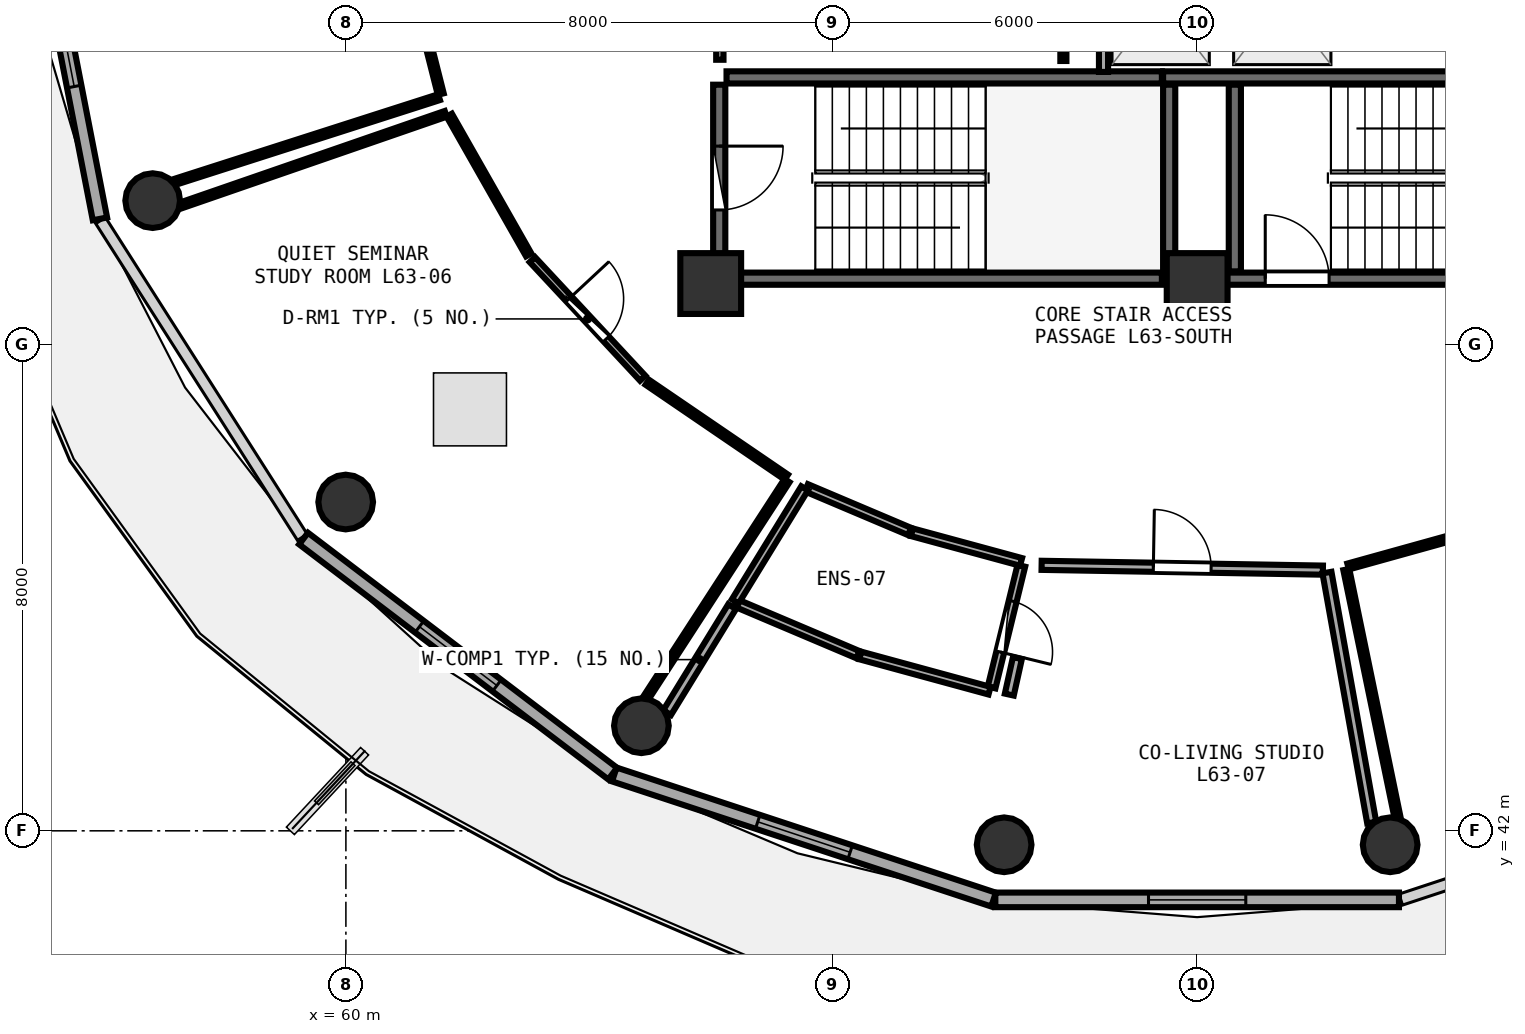
"""IFC4 building model, lengths in metres.
Left out: names, types, materials, properties, quantities, classifications, styles, units other than length and angle.
Written with IfcOpenShell. Run it as: python <this file> out.ifc"""

import sys

from ifc_helpers import new_model, si_unit, direction, frame, frame_2d, origin, origin_2d, place, context, subcontext, project, spatial, rectangle, circle, extrude, element, fill, save


model = new_model("IFC4")
c1 = context("Model", 3, precision=1e-05, world=origin(), true_north=direction((0.0, 1.0)))
c2 = subcontext(c1, "Body", "Model", "MODEL_VIEW")
j1 = project(units=[si_unit("LENGTHUNIT", "METRE"), si_unit("PLANEANGLEUNIT", "RADIAN")], contexts=[c1])
p1 = place(None, origin())
s1 = spatial("IfcSite", under=j1, at=p1, CompositionType="ELEMENT")
p2 = place(p1, origin())
s2 = spatial("IfcBuilding", under=s1, at=p2, CompositionType="ELEMENT")
p3 = place(p2, frame((0.0, 0.0, 248.7)))
s3 = spatial("IfcBuildingStorey", under=s2, at=p3, CompositionType="ELEMENT", Elevation=248.7)
for number, where, z_axis, x_axis in (
    (1, (66.0, 51.0, 0.0), (0.0, 0.0, 1.0), (1.0, 0.0, 0.0)),
    (2, (74.0, 51.0, 0.0), (0.0, 0.0, 1.0), (1.0, 0.0, 0.0)),
):
    element("IfcColumn", number, at=place(p3, frame(where, z_axis=z_axis, x_axis=x_axis)), inside=s3, PredefinedType="PILASTER", context=c2, shape_type="SweptSolid", body=[
        extrude(rectangle(XDim=1.0, YDim=1.0, at=origin_2d()), origin(), (0.0, 0.0, 1.0), 3.75),
    ])
for number, where, z_axis, x_axis in (
    (3, (56.823, 52.364, 0.0), (0.0, 0.0, 1.0), (1.0, 0.0, 0.0)),
    (4, (59.997, 47.407, 0.0), (0.0, 0.0, 1.0), (1.0, 0.0, 0.0)),
    (5, (64.86, 43.728, 0.0), (0.0, 0.0, 1.0), (1.0, 0.0, 0.0)),
    (6, (70.826, 41.771, 0.0), (0.0, 0.0, 1.0), (1.0, 0.0, 0.0)),
    (7, (77.174, 41.771, 0.0), (0.0, 0.0, 1.0), (1.0, 0.0, 0.0)),
):
    element("IfcColumn", number, at=place(p3, frame(where, z_axis=z_axis, x_axis=x_axis)), inside=s3, PredefinedType="COLUMN", context=c2, shape_type="SweptSolid", body=[
        extrude(circle(Radius=0.45, at=origin_2d()), origin(), (0.0, 0.0, 1.0), 3.75),
    ])
p4 = place(p3, frame((54.803, 57.985, 0.0), z_axis=(0.0, 0.0, 1.0), x_axis=(0.190969309115, -0.981596008028, 0.0)))
e8 = element("IfcWall", 8, at=p4, inside=s3, PredefinedType="SOLIDWALL", context=c2, shape_type="SweptSolid", body=[
    extrude(rectangle(XDim=6.033, YDim=0.24, at=frame_2d((3.017, 0.0))), origin(), (0.0, 0.0, 1.0), 3.475),
])
p5 = place(p4, frame((2.216, 0.0, 0.85)))
e9 = element("IfcOpeningElement", 9, at=p5, cuts=e8, PredefinedType="OPENING", context=c2, shape_type="SweptSolid", body=[
    extrude(rectangle(XDim=1.6, YDim=1.45, at=frame_2d((0.8, 0.725))), frame((0.0, 0.13, 0.0), z_axis=(0.0, -1.0, 0.0), x_axis=(1.0, 0.0, 0.0)), (0.0, 0.0, 1.0), 0.26),
])
p6 = place(p3, frame((59.304, 46.806, 0.0), z_axis=(0.0, 0.0, 1.0), x_axis=(0.796010444211, -0.605282886514, 0.0)))
e10 = element("IfcWall", 10, at=p6, inside=s3, PredefinedType="SOLIDWALL", context=c2, shape_type="SweptSolid", body=[
    extrude(rectangle(XDim=6.387, YDim=0.24, at=frame_2d((3.194, 0.0))), origin(), (0.0, 0.0, 1.0), 3.475),
])
p7 = place(p6, frame((2.394, 0.0, 0.85)))
e11 = element("IfcOpeningElement", 11, at=p7, cuts=e10, PredefinedType="OPENING", context=c2, shape_type="SweptSolid", body=[
    extrude(rectangle(XDim=1.6, YDim=1.45, at=frame_2d((0.8, 0.725))), frame((0.0, 0.13, 0.0), z_axis=(0.0, -1.0, 0.0), x_axis=(1.0, 0.0, 0.0)), (0.0, 0.0, 1.0), 0.26),
])
p8 = place(p3, frame((64.414, 42.927, 0.0), z_axis=(0.0, 0.0, 1.0), x_axis=(0.949663708393, -0.313271193954, 0.0)))
e12 = element("IfcWall", 12, at=p8, inside=s3, PredefinedType="SOLIDWALL", context=c2, shape_type="SweptSolid", body=[
    extrude(rectangle(XDim=6.568, YDim=0.24, at=frame_2d((3.284, 0.0))), origin(), (0.0, 0.0, 1.0), 3.475),
])
p9 = place(p8, frame((2.484, 0.0, 0.85)))
e13 = element("IfcOpeningElement", 13, at=p9, cuts=e12, PredefinedType="OPENING", context=c2, shape_type="SweptSolid", body=[
    extrude(rectangle(XDim=1.6, YDim=1.45, at=frame_2d((0.8, 0.725))), frame((0.0, 0.13, 0.0), z_axis=(0.0, -1.0, 0.0), x_axis=(1.0, 0.0, 0.0)), (0.0, 0.0, 1.0), 0.26),
])
p10 = place(p3, frame((70.681, 40.864, 0.0), z_axis=(0.0, 0.0, 1.0), x_axis=(1.0, 0.0, 0.0)))
e14 = element("IfcWall", 14, at=p10, inside=s3, PredefinedType="SOLIDWALL", context=c2, shape_type="SweptSolid", body=[
    extrude(rectangle(XDim=6.638, YDim=0.24, at=frame_2d((3.319, 0.0))), origin(), (0.0, 0.0, 1.0), 3.475),
])
p11 = place(p10, frame((2.519, 0.0, 0.85)))
e15 = element("IfcOpeningElement", 15, at=p11, cuts=e14, PredefinedType="OPENING", context=c2, shape_type="SweptSolid", body=[
    extrude(rectangle(XDim=1.6, YDim=1.45, at=frame_2d((0.8, 0.725))), frame((0.0, 0.13, 0.0), z_axis=(0.0, -1.0, 0.0), x_axis=(1.0, 0.0, 0.0)), (0.0, 0.0, 1.0), 0.26),
])
p12 = place(p3, frame((74.0, 51.08, 0.0), z_axis=(0.0, 0.0, 1.0), x_axis=(1.0, 0.0, 0.0)))
e16 = element("IfcWall", 16, at=p12, inside=s3, PredefinedType="SHEAR", context=c2, shape_type="SweptSolid", body=[
    extrude(rectangle(XDim=7.9, YDim=0.2, at=frame_2d((3.95, 0.0))), origin(), (0.0, 0.0, 1.0), 3.49),
])
p13 = place(p12, frame((1.12, 0.0, 0.0)))
e17 = element("IfcOpeningElement", 17, at=p13, cuts=e16, PredefinedType="OPENING", context=c2, shape_type="SweptSolid", body=[
    extrude(rectangle(XDim=1.05, YDim=2.1, at=frame_2d((0.525, 1.05))), frame((0.0, 0.11, 0.0), z_axis=(0.0, -1.0, 0.0), x_axis=(1.0, 0.0, 0.0)), (0.0, 0.0, 1.0), 0.22),
])
p14 = place(p3, frame((81.9, 54.39, 0.0), z_axis=(0.0, 0.0, 1.0), x_axis=(-1.0, 0.0, 0.0)))
e18 = element("IfcWall", 18, at=p14, inside=s3, PredefinedType="SHEAR", context=c2, shape_type="SweptSolid", body=[
    extrude(rectangle(XDim=8.46, YDim=0.2, at=frame_2d((4.23, 0.0))), origin(), (0.0, 0.0, 1.0), 3.49),
])
p15 = place(p3, frame((74.62, 54.27, 0.0), z_axis=(0.0, 0.0, 1.0), x_axis=(0.0, -1.0, 0.0)))
e19 = element("IfcWall", 19, at=p15, inside=s3, PredefinedType="SHEAR", context=c2, shape_type="SweptSolid", body=[
    extrude(rectangle(XDim=3.07, YDim=0.2, at=frame_2d((1.535, 0.0))), origin(), (0.0, 0.0, 1.0), 3.49),
])
p16 = place(p3, frame((66.26, 51.08, 0.0), z_axis=(0.0, 0.0, 1.0), x_axis=(1.0, 0.0, 0.0)))
e20 = element("IfcWall", 20, at=p16, inside=s3, PredefinedType="SHEAR", context=c2, shape_type="SweptSolid", body=[
    extrude(rectangle(XDim=7.16, YDim=0.2, at=frame_2d((3.58, 0.0))), origin(), (0.0, 0.0, 1.0), 3.49),
])
p17 = place(p3, frame((73.54, 51.2, 0.0), z_axis=(0.0, 0.0, 1.0), x_axis=(0.0, 1.0, 0.0)))
e21 = element("IfcWall", 21, at=p17, inside=s3, PredefinedType="SHEAR", context=c2, shape_type="SweptSolid", body=[
    extrude(rectangle(XDim=3.07, YDim=0.2, at=frame_2d((1.535, 0.0))), origin(), (0.0, 0.0, 1.0), 3.49),
])
p18 = place(p3, frame((73.42, 54.39, 0.0), z_axis=(0.0, 0.0, 1.0), x_axis=(-1.0, 0.0, 0.0)))
e22 = element("IfcWall", 22, at=p18, inside=s3, PredefinedType="SHEAR", context=c2, shape_type="SweptSolid", body=[
    extrude(rectangle(XDim=7.16, YDim=0.2, at=frame_2d((3.58, 0.0))), origin(), (0.0, 0.0, 1.0), 3.49),
])
p19 = place(p3, frame((66.14, 54.27, 0.0), z_axis=(0.0, 0.0, 1.0), x_axis=(0.0, -1.0, 0.0)))
e23 = element("IfcWall", 23, at=p19, inside=s3, PredefinedType="SHEAR", context=c2, shape_type="SweptSolid", body=[
    extrude(rectangle(XDim=3.07, YDim=0.2, at=frame_2d((1.535, 0.0))), origin(), (0.0, 0.0, 1.0), 3.49),
])
p20 = place(p19, frame((1.01, 0.0, 0.0)))
e24 = element("IfcOpeningElement", 24, at=p20, cuts=e23, PredefinedType="OPENING", context=c2, shape_type="SweptSolid", body=[
    extrude(rectangle(XDim=1.05, YDim=2.1, at=frame_2d((0.525, 1.05))), frame((0.0, 0.11, 0.0), z_axis=(0.0, -1.0, 0.0), x_axis=(1.0, 0.0, 0.0)), (0.0, 0.0, 1.0), 0.22),
])
p21 = place(p3, frame((72.46, 54.48, 0.0), z_axis=(0.0, 0.0, 1.0), x_axis=(0.0, 1.0, 0.0)))
e25 = element("IfcWall", 25, at=p21, inside=s3, PredefinedType="PARTITIONING", context=c2, shape_type="SweptSolid", body=[
    extrude(rectangle(XDim=2.29, YDim=0.15, at=frame_2d((1.145, 0.0))), origin(), (0.0, 0.0, 1.0), 3.48),
])
p22 = place(p3, frame((66.15, 54.68, 0.0), z_axis=(0.0, 0.0, 1.0), x_axis=(0.0, 1.0, 0.0)))
e26 = element("IfcWall", 26, at=p22, inside=s3, PredefinedType="PARTITIONING", context=c2, shape_type="SweptSolid", body=[
    extrude(rectangle(XDim=2.11, YDim=0.12, at=frame_2d((1.055, 0.0))), origin(), (0.0, 0.0, 1.0), 2.775),
])
p23 = place(p22, frame((0.605, 0.0, 0.0)))
e27 = element("IfcOpeningElement", 27, at=p23, cuts=e26, PredefinedType="OPENING", context=c2, shape_type="SweptSolid", body=[
    extrude(rectangle(XDim=0.9, YDim=2.08, at=frame_2d((0.45, 1.04))), frame((0.0, 0.07, 0.0), z_axis=(0.0, -1.0, 0.0), x_axis=(1.0, 0.0, 0.0)), (0.0, 0.0, 1.0), 0.14),
])
p24 = place(p3, frame((63.067, 51.393, 0.0), z_axis=(0.0, 0.0, 1.0), x_axis=(0.681315269885, -0.731990097625, 0.0)))
e28 = element("IfcWall", 28, at=p24, inside=s3, PredefinedType="PARTITIONING", context=c2, shape_type="SweptSolid", body=[
    extrude(rectangle(XDim=2.664, YDim=0.12, at=frame_2d((1.332, 0.0))), origin(), (0.0, 0.0, 1.0), 3.075),
])
p25 = place(p24, frame((0.882, 0.0, 0.0)))
e29 = element("IfcOpeningElement", 29, at=p25, cuts=e28, PredefinedType="OPENING", context=c2, shape_type="SweptSolid", body=[
    extrude(rectangle(XDim=0.9, YDim=2.08, at=frame_2d((0.45, 1.04))), frame((0.0, 0.07, 0.0), z_axis=(0.0, -1.0, 0.0), x_axis=(1.0, 0.0, 0.0)), (0.0, 0.0, 1.0), 0.14),
])
p26 = place(p3, frame((71.109, 46.359, 0.0), z_axis=(0.0, 0.0, 1.0), x_axis=(-0.237485395018, -0.971391109262, 0.0)))
e30 = element("IfcWall", 30, at=p26, inside=s3, PredefinedType="PLUMBINGWALL", context=c2, shape_type="SweptSolid", body=[
    extrude(rectangle(XDim=2.06, YDim=0.13, at=frame_2d((1.03, 0.0))), origin(), (0.0, 0.0, 1.0), 3.175),
])
p27 = place(p26, frame((0.6, 0.0, 0.0)))
e31 = element("IfcOpeningElement", 31, at=p27, cuts=e30, PredefinedType="OPENING", context=c2, shape_type="SweptSolid", body=[
    extrude(rectangle(XDim=0.86, YDim=2.05, at=frame_2d((0.43, 1.025))), frame((0.0, 0.075, 0.0), z_axis=(0.0, -1.0, 0.0), x_axis=(1.0, 0.0, 0.0)), (0.0, 0.0, 1.0), 0.15),
])
p28 = place(p3, frame((71.442, 46.366, 0.0), z_axis=(0.0, 0.0, 1.0), x_axis=(0.99985475278, -0.017043278545, 0.0)))
e32 = element("IfcWall", 32, at=p28, inside=s3, PredefinedType="PARTITIONING", context=c2, shape_type="SweptSolid", body=[
    extrude(rectangle(XDim=4.627, YDim=0.15, at=frame_2d((2.313, 0.0))), origin(), (0.0, 0.0, 1.0), 3.075),
])
p29 = place(p28, frame((1.838, 0.0, 0.0)))
e33 = element("IfcOpeningElement", 33, at=p29, cuts=e32, PredefinedType="OPENING", context=c2, shape_type="SweptSolid", body=[
    extrude(rectangle(XDim=0.95, YDim=2.08, at=frame_2d((0.475, 1.04))), frame((0.0, 0.085, 0.0), z_axis=(0.0, -1.0, 0.0), x_axis=(1.0, 0.0, 0.0)), (0.0, 0.0, 1.0), 0.17),
])
p30 = place(p3, frame((71.8, 54.66, 0.0), z_axis=(0.0, 0.0, 1.0), x_axis=(0.0, 1.0, 0.0)))
e34 = element("IfcWall", 34, at=p30, inside=s3, PredefinedType="PARTITIONING", context=c2, shape_type="SweptSolid", body=[
    extrude(rectangle(XDim=2.15, YDim=0.1, at=frame_2d((1.075, 0.0))), origin(), (0.0, 0.0, 1.0), 3.48),
])
p31 = place(p3, frame((60.923, 56.631, 0.0), z_axis=(0.0, 0.0, 1.0), x_axis=(0.245655775867, -0.969357127061, 0.0)))
e35 = element("IfcWall", 35, at=p31, inside=s3, PredefinedType="PARTITIONING", context=c2, shape_type="SweptSolid", body=[
    extrude(rectangle(XDim=2.595, YDim=0.1, at=frame_2d((1.297, 0.0))), origin(), (0.0, 0.0, 1.0), 3.48),
])
p32 = place(p3, frame((61.532, 54.065, 0.0), z_axis=(0.0, 0.0, 1.0), x_axis=(-0.95227750557, -0.305233602976, 0.0)))
e36 = element("IfcWall", 36, at=p32, inside=s3, PredefinedType="PARTITIONING", context=c2, shape_type="SweptSolid", body=[
    extrude(rectangle(XDim=4.565, YDim=0.1, at=frame_2d((2.283, 0.0))), origin(), (0.0, 0.0, 1.0), 3.175),
])
p33 = place(p3, frame((61.7, 53.769, 0.0), z_axis=(0.0, 0.0, 1.0), x_axis=(0.494277588427, -0.869304127207, 0.0)))
e37 = element("IfcWall", 37, at=p33, inside=s3, PredefinedType="PARTITIONING", context=c2, shape_type="SweptSolid", body=[
    extrude(rectangle(XDim=2.643, YDim=0.1, at=frame_2d((1.322, 0.0))), origin(), (0.0, 0.0, 1.0), 3.075),
])
p34 = place(p3, frame((64.956, 49.376, 0.0), z_axis=(0.0, 0.0, 1.0), x_axis=(0.826087380575, -0.563542047814, 0.0)))
e38 = element("IfcWall", 38, at=p34, inside=s3, PredefinedType="PARTITIONING", context=c2, shape_type="SweptSolid", body=[
    extrude(rectangle(XDim=2.768, YDim=0.1, at=frame_2d((1.384, 0.0))), origin(), (0.0, 0.0, 1.0), 3.075),
])
p35 = place(p3, frame((67.254, 47.76, 0.0), z_axis=(0.0, 0.0, 1.0), x_axis=(-0.544234825024, -0.838932926539, 0.0)))
e39 = element("IfcWall", 39, at=p35, inside=s3, PredefinedType="PARTITIONING", context=c2, shape_type="SweptSolid", body=[
    extrude(rectangle(XDim=4.249, YDim=0.1, at=frame_2d((2.125, 0.0))), origin(), (0.0, 0.0, 1.0), 3.075),
])
p36 = place(p3, frame((57.291, 52.287, 0.0), z_axis=(0.0, 0.0, 1.0), x_axis=(0.945103281494, 0.326771766388, 0.0)))
e40 = element("IfcWall", 40, at=p36, inside=s3, PredefinedType="PARTITIONING", context=c2, shape_type="SweptSolid", body=[
    extrude(rectangle(XDim=4.604, YDim=0.1, at=frame_2d((2.302, 0.0))), origin(), (0.0, 0.0, 1.0), 3.075),
])
p37 = place(p3, frame((67.573, 47.641, 0.0), z_axis=(0.0, 0.0, 1.0), x_axis=(0.920910556575, -0.389773968845, 0.0)))
e41 = element("IfcWall", 41, at=p37, inside=s3, PredefinedType="PLUMBINGWALL", context=c2, shape_type="SweptSolid", body=[
    extrude(rectangle(XDim=1.843, YDim=0.13, at=frame_2d((0.921, 0.0))), origin(), (0.0, 0.0, 1.0), 3.48),
])
p38 = place(p3, frame((69.308, 46.91, 0.0), z_axis=(0.0, 0.0, 1.0), x_axis=(0.96501774213, -0.262184586453, 0.0)))
e42 = element("IfcWall", 42, at=p38, inside=s3, PredefinedType="PLUMBINGWALL", context=c2, shape_type="SweptSolid", body=[
    extrude(rectangle(XDim=1.861, YDim=0.13, at=frame_2d((0.93, 0.0))), origin(), (0.0, 0.0, 1.0), 3.48),
])
p39 = place(p3, frame((70.586, 44.304, 0.0), z_axis=(0.0, 0.0, 1.0), x_axis=(-0.96480470919, 0.262967437384, 0.0)))
e43 = element("IfcWall", 43, at=p39, inside=s3, PredefinedType="PLUMBINGWALL", context=c2, shape_type="SweptSolid", body=[
    extrude(rectangle(XDim=2.204, YDim=0.13, at=frame_2d((1.102, 0.0))), origin(), (0.0, 0.0, 1.0), 3.48),
])
p40 = place(p3, frame((68.422, 44.897, 0.0), z_axis=(0.0, 0.0, 1.0), x_axis=(-0.920791207069, 0.390055833162, 0.0)))
e44 = element("IfcWall", 44, at=p40, inside=s3, PredefinedType="PLUMBINGWALL", context=c2, shape_type="SweptSolid", body=[
    extrude(rectangle(XDim=2.183, YDim=0.13, at=frame_2d((1.092, 0.0))), origin(), (0.0, 0.0, 1.0), 3.48),
])
p41 = place(p3, frame((66.404, 45.773, 0.0), z_axis=(0.0, 0.0, 1.0), x_axis=(0.523029155304, 0.85231479085, 0.0)))
e45 = element("IfcWall", 45, at=p41, inside=s3, PredefinedType="PLUMBINGWALL", context=c2, shape_type="SweptSolid", body=[
    extrude(rectangle(XDim=2.181, YDim=0.13, at=frame_2d((1.091, 0.0))), origin(), (0.0, 0.0, 1.0), 3.175),
])
p42 = place(p3, frame((76.135, 46.247, 0.0), z_axis=(0.0, 0.0, 1.0), x_axis=(0.176199339585, -0.984354505618, 0.0)))
e46 = element("IfcWall", 46, at=p42, inside=s3, PredefinedType="PARTITIONING", context=c2, shape_type="SweptSolid", body=[
    extrude(rectangle(XDim=4.176, YDim=0.15, at=frame_2d((2.088, 0.0))), origin(), (0.0, 0.0, 1.0), 3.075),
])
p43 = place(p3, frame((65.283, 43.944, 0.0), z_axis=(0.0, 0.0, 1.0), x_axis=(0.522864415557, 0.852415862677, 0.0)))
e47 = element("IfcWall", 47, at=p43, inside=s3, PredefinedType="PARTITIONING", context=c2, shape_type="SweptSolid", body=[
    extrude(rectangle(XDim=2.045, YDim=0.15, at=frame_2d((1.022, 0.0))), origin(), (0.0, 0.0, 1.0), 3.235),
])
p44 = place(p3, frame((70.911, 44.24, 0.0), z_axis=(0.0, 0.0, 1.0), x_axis=(0.216216290924, 0.976345489844, 0.0)))
e48 = element("IfcWall", 48, at=p44, inside=s3, PredefinedType="PARTITIONING", context=c2, shape_type="SweptSolid", body=[
    extrude(rectangle(XDim=0.615, YDim=0.15, at=frame_2d((0.308, 0.0))), origin(), (0.0, 0.0, 1.0), 3.48),
])
p45 = place(p3, frame((76.483, 46.347, 0.0), z_axis=(0.0, 0.0, 1.0), x_axis=(0.963478601256, 0.267785333659, 0.0)))
e49 = element("IfcWall", 49, at=p45, inside=s3, PredefinedType="PARTITIONING", context=c2, shape_type="SweptSolid", body=[
    extrude(rectangle(XDim=2.848, YDim=0.1, at=frame_2d((1.424, 0.0))), origin(), (0.0, 0.0, 1.0), 3.48),
])
p46 = place(p3, frame((77.293, 42.23, 0.0), z_axis=(0.0, 0.0, 1.0), x_axis=(-0.202308141573, 0.979321916355, 0.0)))
e50 = element("IfcWall", 50, at=p46, inside=s3, PredefinedType="PARTITIONING", context=c2, shape_type="SweptSolid", body=[
    extrude(rectangle(XDim=4.153, YDim=0.1, at=frame_2d((2.076, 0.0))), origin(), (0.0, 0.0, 1.0), 3.175),
])
p47 = place(p5, origin())
e51 = element("IfcWindow", 51, at=p47, inside=s3, PartitioningType="SINGLE_PANEL", PredefinedType="WINDOW", context=c2, shape_type="SweptSolid", body=[
    extrude(rectangle(XDim=1.6, YDim=1.45, at=frame_2d((0.8, 0.725))), frame((0.0, 0.03, 0.0), z_axis=(0.0, -1.0, 0.0), x_axis=(1.0, 0.0, 0.0)), (0.0, 0.0, 1.0), 0.06),
])
fill(e9, e51)
p48 = place(p7, origin())
e52 = element("IfcWindow", 52, at=p48, inside=s3, PartitioningType="SINGLE_PANEL", PredefinedType="WINDOW", context=c2, shape_type="SweptSolid", body=[
    extrude(rectangle(XDim=1.6, YDim=1.45, at=frame_2d((0.8, 0.725))), frame((0.0, 0.03, 0.0), z_axis=(0.0, -1.0, 0.0), x_axis=(1.0, 0.0, 0.0)), (0.0, 0.0, 1.0), 0.06),
])
fill(e11, e52)
p49 = place(p9, origin())
e53 = element("IfcWindow", 53, at=p49, inside=s3, PartitioningType="SINGLE_PANEL", PredefinedType="WINDOW", context=c2, shape_type="SweptSolid", body=[
    extrude(rectangle(XDim=1.6, YDim=1.45, at=frame_2d((0.8, 0.725))), frame((0.0, 0.03, 0.0), z_axis=(0.0, -1.0, 0.0), x_axis=(1.0, 0.0, 0.0)), (0.0, 0.0, 1.0), 0.06),
])
fill(e13, e53)
p50 = place(p11, origin())
e54 = element("IfcWindow", 54, at=p50, inside=s3, PartitioningType="SINGLE_PANEL", PredefinedType="WINDOW", context=c2, shape_type="SweptSolid", body=[
    extrude(rectangle(XDim=1.6, YDim=1.45, at=frame_2d((0.8, 0.725))), frame((0.0, 0.03, 0.0), z_axis=(0.0, -1.0, 0.0), x_axis=(1.0, 0.0, 0.0)), (0.0, 0.0, 1.0), 0.06),
])
fill(e15, e54)
p51 = place(p13, origin())
e55 = element("IfcDoor", 55, at=p51, inside=s3, OperationType="SINGLE_SWING_LEFT", PredefinedType="DOOR", context=c2, shape_type="SweptSolid", body=[
    extrude(rectangle(XDim=1.05, YDim=2.1, at=frame_2d((0.525, 1.05))), frame((0.0, 0.025, 0.0), z_axis=(0.0, -1.0, 0.0), x_axis=(1.0, 0.0, 0.0)), (0.0, 0.0, 1.0), 0.05),
])
fill(e17, e55)
p52 = place(p20, origin())
e56 = element("IfcDoor", 56, at=p52, inside=s3, OperationType="SINGLE_SWING_LEFT", PredefinedType="DOOR", context=c2, shape_type="SweptSolid", body=[
    extrude(rectangle(XDim=1.05, YDim=2.1, at=frame_2d((0.525, 1.05))), frame((0.0, 0.025, 0.0), z_axis=(0.0, -1.0, 0.0), x_axis=(1.0, 0.0, 0.0)), (0.0, 0.0, 1.0), 0.05),
])
fill(e24, e56)
p53 = place(p25, origin())
e57 = element("IfcDoor", 57, at=p53, inside=s3, OperationType="SINGLE_SWING_LEFT", PredefinedType="DOOR", context=c2, shape_type="SweptSolid", body=[
    extrude(rectangle(XDim=0.9, YDim=2.08, at=frame_2d((0.45, 1.04))), frame((0.0, 0.025, 0.0), z_axis=(0.0, -1.0, 0.0), x_axis=(1.0, 0.0, 0.0)), (0.0, 0.0, 1.0), 0.05),
])
fill(e29, e57)
p54 = place(p27, origin())
e58 = element("IfcDoor", 58, at=p54, inside=s3, OperationType="SINGLE_SWING_RIGHT", PredefinedType="DOOR", context=c2, shape_type="SweptSolid", body=[
    extrude(rectangle(XDim=0.86, YDim=2.05, at=frame_2d((0.43, 1.025))), frame((0.0, 0.025, 0.0), z_axis=(0.0, -1.0, 0.0), x_axis=(1.0, 0.0, 0.0)), (0.0, 0.0, 1.0), 0.05),
])
fill(e31, e58)
p55 = place(p29, origin())
e59 = element("IfcDoor", 59, at=p55, inside=s3, OperationType="SINGLE_SWING_LEFT", PredefinedType="DOOR", context=c2, shape_type="SweptSolid", body=[
    extrude(rectangle(XDim=0.95, YDim=2.08, at=frame_2d((0.475, 1.04))), frame((0.0, 0.025, 0.0), z_axis=(0.0, -1.0, 0.0), x_axis=(1.0, 0.0, 0.0)), (0.0, 0.0, 1.0), 0.05),
])
fill(e33, e59)
save(model, sys.argv[1])
